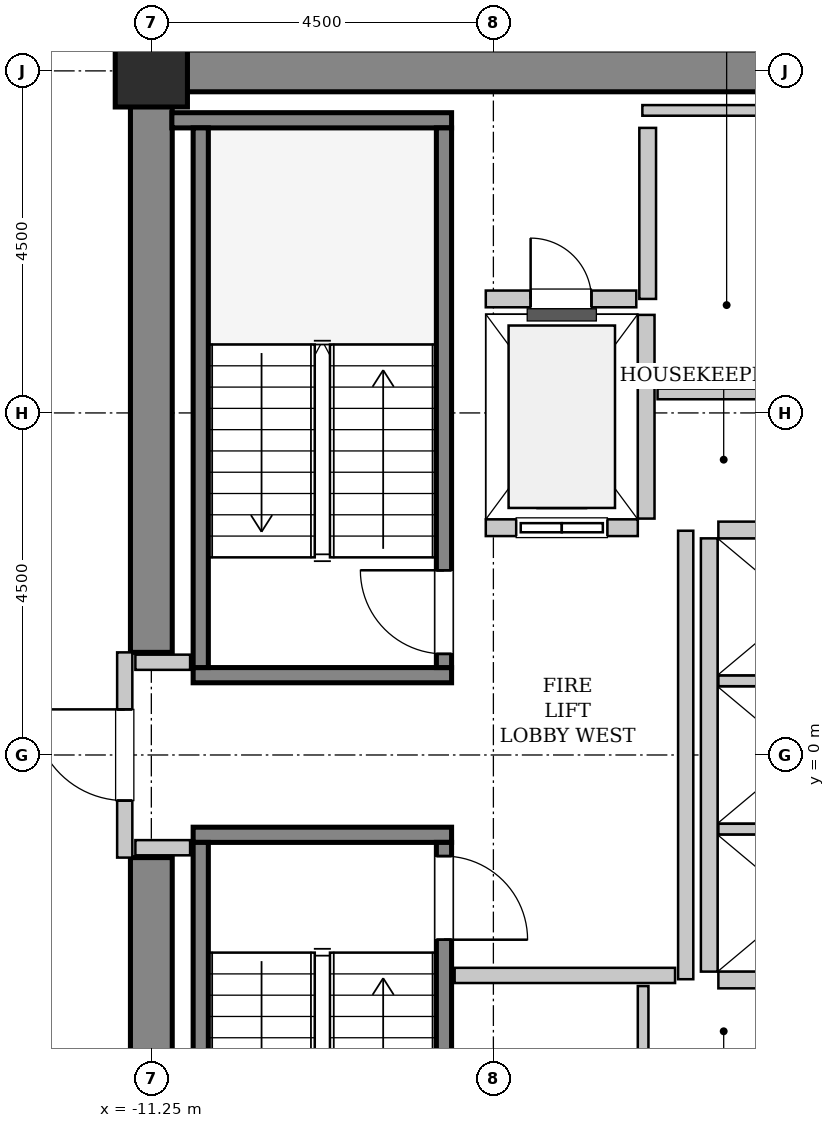
"""IFC4 building model, lengths in metres.
Left out: names, types, materials, properties, quantities, classifications, styles, units other than length and angle.
Written with IfcOpenShell. Run it as: python <this file> out.ifc"""

import sys

from ifc_helpers import new_model, si_unit, direction, frame, frame_2d, origin, origin_2d, place, context, subcontext, project, spatial, rectangle, hollow_rectangle, extrude, source, transform, mapped, element, fill, save


model = new_model("IFC4")
c1 = context("Model", 3, precision=1e-05, world=origin(), true_north=direction((0.0, 1.0)))
c2 = subcontext(c1, "Body", "Model", "MODEL_VIEW")
j1 = project(units=[si_unit("LENGTHUNIT", "METRE"), si_unit("PLANEANGLEUNIT", "RADIAN")], contexts=[c1])
p1 = place(None, origin())
s1 = spatial("IfcSite", under=j1, at=p1, CompositionType="ELEMENT")
p2 = place(p1, origin())
s2 = spatial("IfcBuilding", under=s1, at=p2, CompositionType="ELEMENT")
p3 = place(p2, frame((0.0, 0.0, 156.4)))
s3 = spatial("IfcBuildingStorey", under=s2, at=p3, CompositionType="ELEMENT", Elevation=156.4)
m1 = source(origin(), c2, "Body", "SweptSolid", [
    extrude(rectangle(XDim=9.975, YDim=0.55, at=frame_2d((4.987, 0.0))), origin(), (0.0, 0.0, 1.0), 3.8),
])
p4 = place(p3, frame((-11.525, 9.0, 0.0), z_axis=(0.0, 0.0, 1.0), x_axis=(1.0, 0.0, 0.0)))
e1 = element("IfcWall", 1, at=p4, inside=s3, PredefinedType="SHEAR", context=c2, shape_type="MappedRepresentation", body=[
    mapped(m1, transform((0.0, 0.0, 0.0), x_axis=(1.0, 0.0, 0.0), y_axis=(0.0, 1.0, 0.0), z_axis=(0.0, 0.0, 1.0), scale=1.0)),
])
m2 = source(origin(), c2, "Body", "SweptSolid", [
    extrude(rectangle(XDim=7.375, YDim=0.55, at=frame_2d((3.688, 0.0))), origin(), (0.0, 0.0, 1.0), 3.8),
])
for number, where, z_axis, x_axis in (
    (2, (-11.25, -8.725, 0.0), (0.0, 0.0, 1.0), (0.0, 1.0, 0.0)),
    (3, (-11.25, 1.35, 0.0), (0.0, 0.0, 1.0), (0.0, 1.0, 0.0)),
):
    element("IfcWall", number, at=place(p3, frame(where, z_axis=z_axis, x_axis=x_axis)), inside=s3, PredefinedType="SHEAR", context=c2, shape_type="MappedRepresentation", body=[
        mapped(m2, transform((0.0, 0.0, 0.0), x_axis=(1.0, 0.0, 0.0), y_axis=(0.0, 1.0, 0.0), z_axis=(0.0, 0.0, 1.0), scale=1.0)),
    ])
m3 = source(origin(), c2, "Body", "SweptSolid", [
    extrude(hollow_rectangle(XDim=0.95, YDim=0.95, WallThickness=0.045, InnerFilletRadius=0.045, OuterFilletRadius=0.09, at=origin_2d()), origin(), (0.0, 0.0, 1.0), 3.8),
])
p5 = place(p3, frame((-11.25, 9.0, 0.0), z_axis=(0.0, 0.0, 1.0), x_axis=(1.0, 0.0, 0.0)))
e4 = element("IfcColumn", 4, at=p5, inside=s3, PredefinedType="COLUMN", context=c2, shape_type="MappedRepresentation", body=[
    mapped(m3, transform((0.0, 0.0, 0.0), x_axis=(1.0, 0.0, 0.0), y_axis=(0.0, 1.0, 0.0), z_axis=(0.0, 0.0, 1.0), scale=1.0)),
])
m4 = source(origin(), c2, "Body", "SweptSolid", [
    extrude(rectangle(XDim=3.4, YDim=0.2, at=frame_2d((1.7, 0.0))), origin(), (0.0, 0.0, 1.0), 3.8),
])
p6 = place(p3, frame((-7.3, 1.05, 0.0), z_axis=(0.0, 0.0, 1.0), x_axis=(-1.0, 0.0, 0.0)))
e5 = element("IfcWall", 5, at=p6, inside=s3, PredefinedType="SOLIDWALL", context=c2, shape_type="MappedRepresentation", body=[
    mapped(m4, transform((0.0, 0.0, 0.0), x_axis=(1.0, 0.0, 0.0), y_axis=(0.0, 1.0, 0.0), z_axis=(0.0, 0.0, 1.0), scale=1.0)),
])
m5 = source(origin(), c2, "Body", "SweptSolid", [
    extrude(rectangle(XDim=3.68, YDim=0.2, at=frame_2d((1.84, 0.0))), origin(), (0.0, 0.0, 1.0), 3.8),
])
p7 = place(p3, frame((-7.3, 8.35, 0.0), z_axis=(0.0, 0.0, 1.0), x_axis=(-1.0, 0.0, 0.0)))
e6 = element("IfcWall", 6, at=p7, inside=s3, PredefinedType="SOLIDWALL", context=c2, shape_type="MappedRepresentation", body=[
    mapped(m5, transform((0.0, 0.0, 0.0), x_axis=(1.0, 0.0, 0.0), y_axis=(0.0, 1.0, 0.0), z_axis=(0.0, 0.0, 1.0), scale=1.0)),
])
m6 = source(origin(), c2, "Body", "SweptSolid", [
    extrude(rectangle(XDim=7.1, YDim=0.2, at=frame_2d((3.55, 0.0))), origin(), (0.0, 0.0, 1.0), 3.8),
])
p8 = place(p3, frame((-7.4, 1.15, 0.0), z_axis=(0.0, 0.0, 1.0), x_axis=(0.0, 1.0, 0.0)))
e7 = element("IfcWall", 7, at=p8, inside=s3, PredefinedType="SOLIDWALL", context=c2, shape_type="MappedRepresentation", body=[
    mapped(m6, transform((0.0, 0.0, 0.0), x_axis=(1.0, 0.0, 0.0), y_axis=(0.0, 1.0, 0.0), z_axis=(0.0, 0.0, 1.0), scale=1.0)),
])
p9 = place(p8, frame((0.18, 0.0, 0.0)))
e8 = element("IfcOpeningElement", 8, at=p9, cuts=e7, PredefinedType="OPENING", context=c2, shape_type="SweptSolid", body=[
    extrude(rectangle(XDim=1.1, YDim=2.15, at=frame_2d((0.55, 1.075))), frame((0.0, 0.11, 0.0), z_axis=(0.0, -1.0, 0.0), x_axis=(1.0, 0.0, 0.0)), (0.0, 0.0, 1.0), 0.22),
])
p10 = place(p3, frame((-10.6, 1.15, 0.0), z_axis=(0.0, 0.0, 1.0), x_axis=(0.0, 1.0, 0.0)))
e9 = element("IfcWall", 9, at=p10, inside=s3, PredefinedType="SOLIDWALL", context=c2, shape_type="MappedRepresentation", body=[
    mapped(m6, transform((0.0, 0.0, 0.0), x_axis=(1.0, 0.0, 0.0), y_axis=(0.0, 1.0, 0.0), z_axis=(0.0, 0.0, 1.0), scale=1.0)),
])
p11 = place(p3, frame((-10.7, -1.05, 0.0), z_axis=(0.0, 0.0, 1.0), x_axis=(1.0, 0.0, 0.0)))
e10 = element("IfcWall", 10, at=p11, inside=s3, PredefinedType="SOLIDWALL", context=c2, shape_type="MappedRepresentation", body=[
    mapped(m4, transform((0.0, 0.0, 0.0), x_axis=(1.0, 0.0, 0.0), y_axis=(0.0, 1.0, 0.0), z_axis=(0.0, 0.0, 1.0), scale=1.0)),
])
p12 = place(p3, frame((-10.6, -1.15, 0.0), z_axis=(0.0, 0.0, 1.0), x_axis=(0.0, -1.0, 0.0)))
e11 = element("IfcWall", 11, at=p12, inside=s3, PredefinedType="SOLIDWALL", context=c2, shape_type="MappedRepresentation", body=[
    mapped(m6, transform((0.0, 0.0, 0.0), x_axis=(1.0, 0.0, 0.0), y_axis=(0.0, 1.0, 0.0), z_axis=(0.0, 0.0, 1.0), scale=1.0)),
])
p13 = place(p3, frame((-7.4, -1.15, 0.0), z_axis=(0.0, 0.0, 1.0), x_axis=(0.0, -1.0, 0.0)))
e12 = element("IfcWall", 12, at=p13, inside=s3, PredefinedType="SOLIDWALL", context=c2, shape_type="MappedRepresentation", body=[
    mapped(m6, transform((0.0, 0.0, 0.0), x_axis=(1.0, 0.0, 0.0), y_axis=(0.0, 1.0, 0.0), z_axis=(0.0, 0.0, 1.0), scale=1.0)),
])
p14 = place(p13, frame((0.18, 0.0, 0.0)))
e13 = element("IfcOpeningElement", 13, at=p14, cuts=e12, PredefinedType="OPENING", context=c2, shape_type="SweptSolid", body=[
    extrude(rectangle(XDim=1.1, YDim=2.15, at=frame_2d((0.55, 1.075))), frame((0.0, 0.11, 0.0), z_axis=(0.0, -1.0, 0.0), x_axis=(1.0, 0.0, 0.0)), (0.0, 0.0, 1.0), 0.22),
])
m7 = source(origin(), c2, "Body", "SweptSolid", [
    extrude(rectangle(XDim=2.0, YDim=0.22, at=frame_2d((1.0, 0.0))), origin(), (0.0, 0.0, 1.0), 3.535),
])
p15 = place(p3, frame((-6.85, 2.99, 0.0), z_axis=(0.0, 0.0, 1.0), x_axis=(1.0, 0.0, 0.0)))
e14 = element("IfcWall", 14, at=p15, inside=s3, PredefinedType="SOLIDWALL", context=c2, shape_type="MappedRepresentation", body=[
    mapped(m7, transform((0.0, 0.0, 0.0), x_axis=(1.0, 0.0, 0.0), y_axis=(0.0, 1.0, 0.0), z_axis=(0.0, 0.0, 1.0), scale=1.0)),
])
p16 = place(p15, frame((0.4, 0.0, 0.0)))
e15 = element("IfcOpeningElement", 15, at=p16, cuts=e14, PredefinedType="OPENING", context=c2, shape_type="SweptSolid", body=[
    extrude(rectangle(XDim=1.2, YDim=2.2, at=frame_2d((0.6, 1.1))), frame((0.0, 0.12, 0.0), z_axis=(0.0, -1.0, 0.0), x_axis=(1.0, 0.0, 0.0)), (0.0, 0.0, 1.0), 0.24),
])
m8 = source(origin(), c2, "Body", "SweptSolid", [
    extrude(rectangle(XDim=2.68, YDim=0.22, at=frame_2d((1.34, 0.0))), origin(), (0.0, 0.0, 1.0), 3.535),
])
p17 = place(p3, frame((-4.74, 3.11, 0.0), z_axis=(0.0, 0.0, 1.0), x_axis=(0.0, 1.0, 0.0)))
e16 = element("IfcWall", 16, at=p17, inside=s3, PredefinedType="SOLIDWALL", context=c2, shape_type="MappedRepresentation", body=[
    mapped(m8, transform((0.0, 0.0, 0.0), x_axis=(1.0, 0.0, 0.0), y_axis=(0.0, 1.0, 0.0), z_axis=(0.0, 0.0, 1.0), scale=1.0)),
])
m9 = source(origin(), c2, "Body", "SweptSolid", [
    extrude(rectangle(XDim=5.7, YDim=0.22, at=frame_2d((2.85, 0.0))), origin(), (0.0, 0.0, 1.0), 3.535),
])
p18 = place(p3, frame((-3.91, 2.85, 0.0), z_axis=(0.0, 0.0, 1.0), x_axis=(0.0, -1.0, 0.0)))
e17 = element("IfcWall", 17, at=p18, inside=s3, PredefinedType="SOLIDWALL", context=c2, shape_type="MappedRepresentation", body=[
    mapped(m9, transform((0.0, 0.0, 0.0), x_axis=(1.0, 0.0, 0.0), y_axis=(0.0, 1.0, 0.0), z_axis=(0.0, 0.0, 1.0), scale=1.0)),
])
m10 = source(origin(), c2, "Body", "SweptSolid", [
    extrude(rectangle(XDim=2.13, YDim=0.22, at=frame_2d((1.065, 0.0))), origin(), (0.0, 0.0, 1.0), 3.535),
])
p19 = place(p3, frame((-3.79, -2.96, 0.0), z_axis=(0.0, 0.0, 1.0), x_axis=(1.0, 0.0, 0.0)))
e18 = element("IfcWall", 18, at=p19, inside=s3, PredefinedType="SOLIDWALL", context=c2, shape_type="MappedRepresentation", body=[
    mapped(m10, transform((0.0, 0.0, 0.0), x_axis=(1.0, 0.0, 0.0), y_axis=(0.0, 1.0, 0.0), z_axis=(0.0, 0.0, 1.0), scale=1.0)),
])
m11 = source(origin(), c2, "Body", "SweptSolid", [
    extrude(rectangle(XDim=2.13, YDim=0.14, at=frame_2d((1.065, 0.0))), origin(), (0.0, 0.0, 1.0), 3.535),
])
for number, where, z_axis, x_axis in (
    (19, (-3.79, -0.975, 0.0), (0.0, 0.0, 1.0), (1.0, 0.0, 0.0)),
    (20, (-3.79, 0.975, 0.0), (0.0, 0.0, 1.0), (1.0, 0.0, 0.0)),
):
    element("IfcWall", number, at=place(p3, frame(where, z_axis=z_axis, x_axis=x_axis)), inside=s3, PredefinedType="PARTITIONING", context=c2, shape_type="MappedRepresentation", body=[
        mapped(m11, transform((0.0, 0.0, 0.0), x_axis=(1.0, 0.0, 0.0), y_axis=(0.0, 1.0, 0.0), z_axis=(0.0, 0.0, 1.0), scale=1.0)),
    ])
p20 = place(p3, frame((-1.66, 2.96, 0.0), z_axis=(0.0, 0.0, 1.0), x_axis=(-1.0, 0.0, 0.0)))
e21 = element("IfcWall", 21, at=p20, inside=s3, PredefinedType="SOLIDWALL", context=c2, shape_type="MappedRepresentation", body=[
    mapped(m10, transform((0.0, 0.0, 0.0), x_axis=(1.0, 0.0, 0.0), y_axis=(0.0, 1.0, 0.0), z_axis=(0.0, 0.0, 1.0), scale=1.0)),
])
m12 = source(origin(), c2, "Body", "SweptSolid", [
    extrude(rectangle(XDim=2.25, YDim=0.22, at=frame_2d((1.125, 0.0))), origin(), (0.0, 0.0, 1.0), 3.535),
])
p21 = place(p3, frame((-4.72, 6.0, 0.0), z_axis=(0.0, 0.0, 1.0), x_axis=(0.0, 1.0, 0.0)))
e22 = element("IfcWall", 22, at=p21, inside=s3, PredefinedType="SOLIDWALL", context=c2, shape_type="MappedRepresentation", body=[
    mapped(m12, transform((0.0, 0.0, 0.0), x_axis=(1.0, 0.0, 0.0), y_axis=(0.0, 1.0, 0.0), z_axis=(0.0, 0.0, 1.0), scale=1.0)),
])
m13 = source(origin(), c2, "Body", "SweptSolid", [
    extrude(rectangle(XDim=1.98, YDim=0.22, at=frame_2d((0.99, 0.0))), origin(), (0.0, 0.0, 1.0), 3.535),
])
p22 = place(p3, frame((-6.85, 6.0, 0.0), z_axis=(0.0, 0.0, 1.0), x_axis=(1.0, 0.0, 0.0)))
e23 = element("IfcWall", 23, at=p22, inside=s3, PredefinedType="SOLIDWALL", context=c2, shape_type="MappedRepresentation", body=[
    mapped(m13, transform((0.0, 0.0, 0.0), x_axis=(1.0, 0.0, 0.0), y_axis=(0.0, 1.0, 0.0), z_axis=(0.0, 0.0, 1.0), scale=1.0)),
])
p23 = place(p22, frame((0.59, 0.0, 0.0)))
e24 = element("IfcOpeningElement", 24, at=p23, cuts=e23, PredefinedType="OPENING", context=c2, shape_type="SweptSolid", body=[
    extrude(rectangle(XDim=0.8, YDim=2.0, at=frame_2d((0.4, 1.0))), frame((0.0, 0.12, 0.0), z_axis=(0.0, -1.0, 0.0), x_axis=(1.0, 0.0, 0.0)), (0.0, 0.0, 1.0), 0.24),
])
m14 = source(origin(), c2, "Body", "SweptSolid", [
    extrude(rectangle(XDim=2.7, YDim=0.2, at=frame_2d((1.35, 0.0))), origin(), (0.0, 0.0, 1.0), 2.425),
])
p24 = place(p3, frame((-11.6, -1.35, 0.0), z_axis=(0.0, 0.0, 1.0), x_axis=(0.0, 1.0, 0.0)))
e25 = element("IfcWall", 25, at=p24, inside=s3, PredefinedType="PARTITIONING", context=c2, shape_type="MappedRepresentation", body=[
    mapped(m14, transform((0.0, 0.0, 0.0), x_axis=(1.0, 0.0, 0.0), y_axis=(0.0, 1.0, 0.0), z_axis=(0.0, 0.0, 1.0), scale=1.0)),
])
p25 = place(p24, frame((0.75, 0.0, 0.0)))
e26 = element("IfcOpeningElement", 26, at=p25, cuts=e25, PredefinedType="OPENING", context=c2, shape_type="SweptSolid", body=[
    extrude(rectangle(XDim=1.2, YDim=2.15, at=frame_2d((0.6, 1.075))), frame((0.0, 0.11, 0.0), z_axis=(0.0, -1.0, 0.0), x_axis=(1.0, 0.0, 0.0)), (0.0, 0.0, 1.0), 0.22),
])
m15 = source(origin(), c2, "Body", "SweptSolid", [
    extrude(rectangle(XDim=5.9, YDim=0.2, at=frame_2d((2.95, 0.0))), origin(), (0.0, 0.0, 1.0), 3.535),
])
p26 = place(p3, frame((-4.22, -2.95, 0.0), z_axis=(0.0, 0.0, 1.0), x_axis=(0.0, 1.0, 0.0)))
e27 = element("IfcWall", 27, at=p26, inside=s3, PredefinedType="PARTITIONING", context=c2, shape_type="MappedRepresentation", body=[
    mapped(m15, transform((0.0, 0.0, 0.0), x_axis=(1.0, 0.0, 0.0), y_axis=(0.0, 1.0, 0.0), z_axis=(0.0, 0.0, 1.0), scale=1.0)),
])
m16 = source(origin(), c2, "Body", "SweptSolid", [
    extrude(rectangle(XDim=2.9, YDim=0.2, at=frame_2d((1.45, 0.0))), origin(), (0.0, 0.0, 1.0), 3.535),
])
p27 = place(p3, frame((-7.26, -2.9, 0.0), z_axis=(0.0, 0.0, 1.0), x_axis=(1.0, 0.0, 0.0)))
e28 = element("IfcWall", 28, at=p27, inside=s3, PredefinedType="PARTITIONING", context=c2, shape_type="MappedRepresentation", body=[
    mapped(m16, transform((0.0, 0.0, 0.0), x_axis=(1.0, 0.0, 0.0), y_axis=(0.0, 1.0, 0.0), z_axis=(0.0, 0.0, 1.0), scale=1.0)),
])
m17 = source(origin(), c2, "Body", "SweptSolid", [
    extrude(rectangle(XDim=0.72, YDim=0.2, at=frame_2d((0.36, 0.0))), origin(), (0.0, 0.0, 1.0), 3.535),
])
for number, where, z_axis, x_axis in (
    (29, (-11.46, 1.22, 0.0), (0.0, 0.0, 1.0), (1.0, 0.0, 0.0)),
    (30, (-11.46, -1.22, 0.0), (0.0, 0.0, 1.0), (1.0, 0.0, 0.0)),
):
    element("IfcWall", number, at=place(p3, frame(where, z_axis=z_axis, x_axis=x_axis)), inside=s3, PredefinedType="PARTITIONING", context=c2, shape_type="MappedRepresentation", body=[
        mapped(m17, transform((0.0, 0.0, 0.0), x_axis=(1.0, 0.0, 0.0), y_axis=(0.0, 1.0, 0.0), z_axis=(0.0, 0.0, 1.0), scale=1.0)),
    ])
m18 = source(origin(), c2, "Body", "SweptSolid", [
    extrude(rectangle(XDim=2.95, YDim=0.14, at=frame_2d((1.475, 0.0))), origin(), (0.0, 0.0, 1.0), 3.535),
])
p28 = place(p3, frame((-4.59, 4.75, 0.0), z_axis=(0.0, 0.0, 1.0), x_axis=(1.0, 0.0, 0.0)))
e31 = element("IfcWall", 31, at=p28, inside=s3, PredefinedType="PARTITIONING", context=c2, shape_type="MappedRepresentation", body=[
    mapped(m18, transform((0.0, 0.0, 0.0), x_axis=(1.0, 0.0, 0.0), y_axis=(0.0, 1.0, 0.0), z_axis=(0.0, 0.0, 1.0), scale=1.0)),
])
m19 = source(origin(), c2, "Body", "SweptSolid", [
    extrude(rectangle(XDim=3.15, YDim=0.14, at=frame_2d((1.575, 0.0))), origin(), (0.0, 0.0, 1.0), 3.535),
])
p29 = place(p3, frame((-4.79, 8.48, 0.0), z_axis=(0.0, 0.0, 1.0), x_axis=(1.0, 0.0, 0.0)))
e32 = element("IfcWall", 32, at=p29, inside=s3, PredefinedType="PARTITIONING", context=c2, shape_type="MappedRepresentation", body=[
    mapped(m19, transform((0.0, 0.0, 0.0), x_axis=(1.0, 0.0, 0.0), y_axis=(0.0, 1.0, 0.0), z_axis=(0.0, 0.0, 1.0), scale=1.0)),
])
m20 = source(origin(), c2, "Body", "SweptSolid", [
    extrude(rectangle(XDim=1.1, YDim=0.14, at=frame_2d((0.55, 0.0))), origin(), (0.0, 0.0, 1.0), 3.535),
])
p30 = place(p3, frame((-4.78, -4.14, 0.0), z_axis=(0.0, 0.0, 1.0), x_axis=(0.0, 1.0, 0.0)))
e33 = element("IfcWall", 33, at=p30, inside=s3, PredefinedType="PARTITIONING", context=c2, shape_type="MappedRepresentation", body=[
    mapped(m20, transform((0.0, 0.0, 0.0), x_axis=(1.0, 0.0, 0.0), y_axis=(0.0, 1.0, 0.0), z_axis=(0.0, 0.0, 1.0), scale=1.0)),
])
m21 = source(origin(), c2, "Body", "SweptSolid", [
    extrude(rectangle(XDim=1.1, YDim=2.15, at=frame_2d((0.55, 1.075))), frame((0.0, 0.025, 0.0), z_axis=(0.0, -1.0, 0.0), x_axis=(1.0, 0.0, 0.0)), (0.0, 0.0, 1.0), 0.05),
])
p31 = place(p9, origin())
e34 = element("IfcDoor", 34, at=p31, inside=s3, OperationType="SINGLE_SWING_RIGHT", PredefinedType="DOOR", context=c2, shape_type="MappedRepresentation", body=[
    mapped(m21, transform((0.0, 0.0, 0.0), x_axis=(1.0, 0.0, 0.0), y_axis=(0.0, 1.0, 0.0), z_axis=(0.0, 0.0, 1.0), scale=1.0)),
])
fill(e8, e34)
p32 = place(p14, origin())
e35 = element("IfcDoor", 35, at=p32, inside=s3, OperationType="SINGLE_SWING_RIGHT", PredefinedType="DOOR", context=c2, shape_type="MappedRepresentation", body=[
    mapped(m21, transform((0.0, 0.0, 0.0), x_axis=(1.0, 0.0, 0.0), y_axis=(0.0, 1.0, 0.0), z_axis=(0.0, 0.0, 1.0), scale=1.0)),
])
fill(e13, e35)
m22 = source(origin(), c2, "Body", "SweptSolid", [
    extrude(rectangle(XDim=1.2, YDim=2.2, at=frame_2d((0.6, 1.1))), frame((0.0, 0.025, 0.0), z_axis=(0.0, -1.0, 0.0), x_axis=(1.0, 0.0, 0.0)), (0.0, 0.0, 1.0), 0.05),
])
p33 = place(p16, origin())
e36 = element("IfcDoor", 36, at=p33, inside=s3, OperationType="SLIDING_TO_LEFT", PredefinedType="DOOR", context=c2, shape_type="MappedRepresentation", body=[
    mapped(m22, transform((0.0, 0.0, 0.0), x_axis=(1.0, 0.0, 0.0), y_axis=(0.0, 1.0, 0.0), z_axis=(0.0, 0.0, 1.0), scale=1.0)),
])
fill(e15, e36)
m23 = source(origin(), c2, "Body", "SweptSolid", [
    extrude(rectangle(XDim=0.8, YDim=2.0, at=frame_2d((0.4, 1.0))), frame((0.0, 0.025, 0.0), z_axis=(0.0, -1.0, 0.0), x_axis=(1.0, 0.0, 0.0)), (0.0, 0.0, 1.0), 0.05),
])
p34 = place(p23, origin())
e37 = element("IfcDoor", 37, at=p34, inside=s3, OperationType="SINGLE_SWING_LEFT", PredefinedType="TRAPDOOR", context=c2, shape_type="MappedRepresentation", body=[
    mapped(m23, transform((0.0, 0.0, 0.0), x_axis=(1.0, 0.0, 0.0), y_axis=(0.0, 1.0, 0.0), z_axis=(0.0, 0.0, 1.0), scale=1.0)),
])
fill(e24, e37)
m24 = source(origin(), c2, "Body", "SweptSolid", [
    extrude(rectangle(XDim=1.2, YDim=2.15, at=frame_2d((0.6, 1.075))), frame((0.0, 0.025, 0.0), z_axis=(0.0, -1.0, 0.0), x_axis=(1.0, 0.0, 0.0)), (0.0, 0.0, 1.0), 0.05),
])
p35 = place(p25, origin())
e38 = element("IfcDoor", 38, at=p35, inside=s3, OperationType="SINGLE_SWING_RIGHT", PredefinedType="DOOR", context=c2, shape_type="MappedRepresentation", body=[
    mapped(m24, transform((0.0, 0.0, 0.0), x_axis=(1.0, 0.0, 0.0), y_axis=(0.0, 1.0, 0.0), z_axis=(0.0, 0.0, 1.0), scale=1.0)),
])
fill(e26, e38)
save(model, sys.argv[1])
